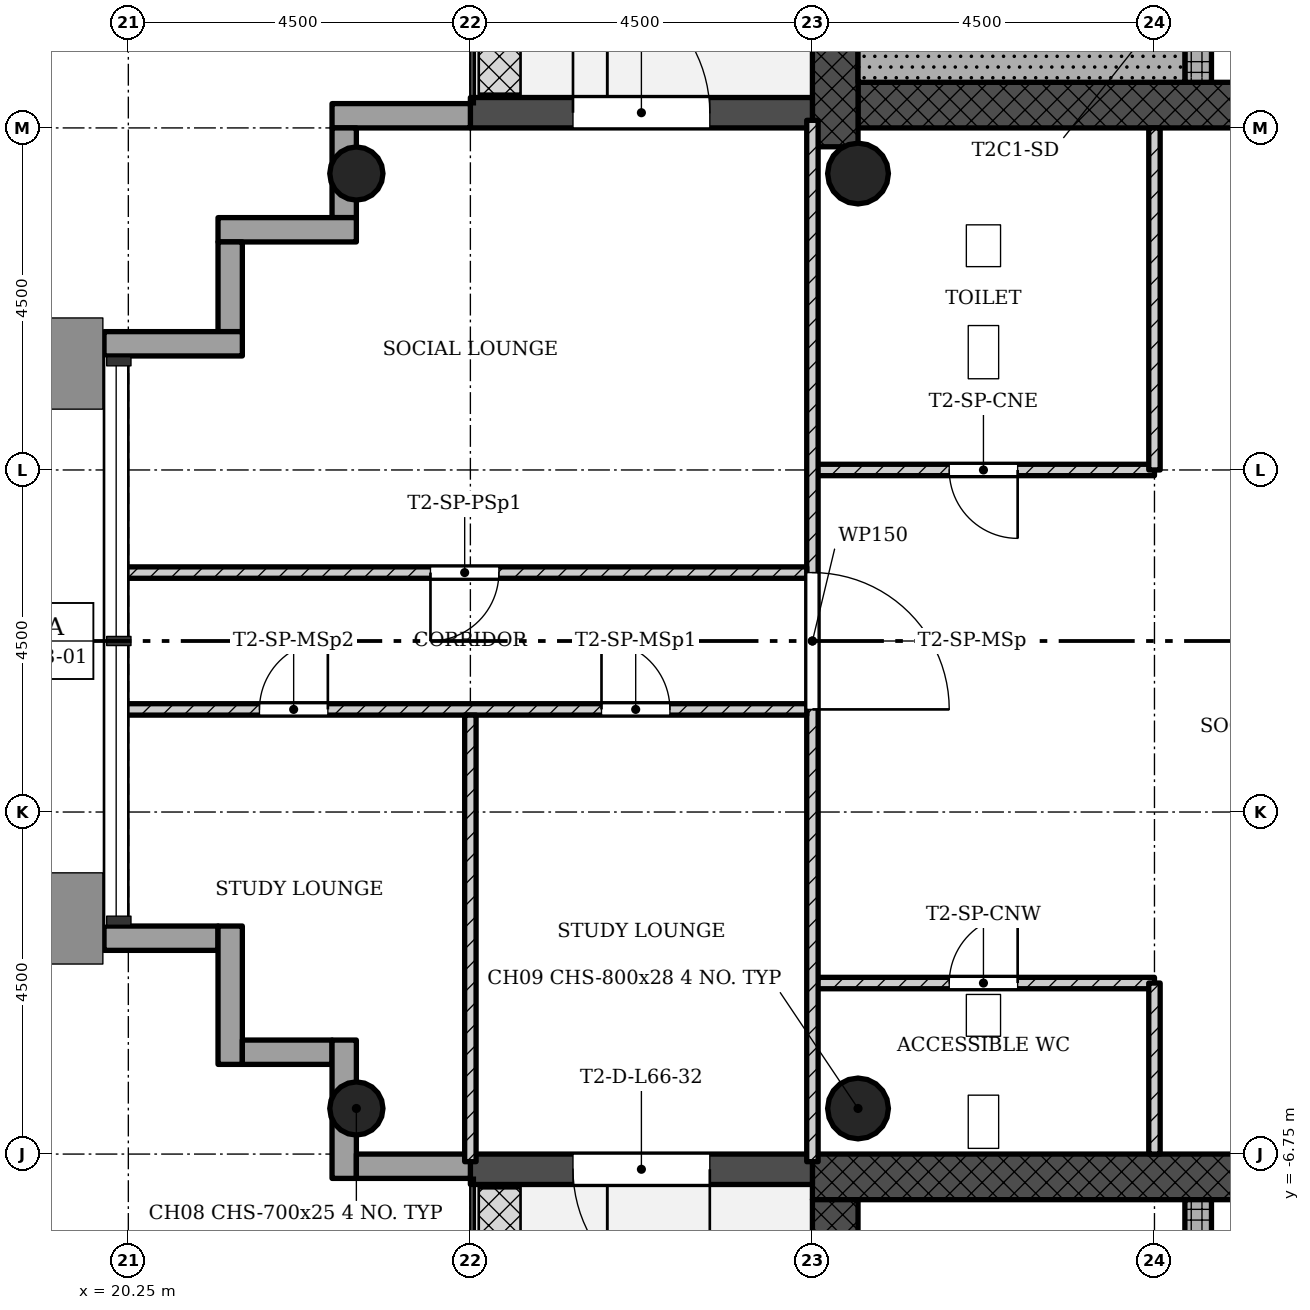
"""IFC4 building model, lengths in metres.
Left out: names, types, materials, properties, quantities, classifications, styles, units other than length and angle.
Written with IfcOpenShell. Run it as: python <this file> out.ifc"""

import sys

from ifc_helpers import new_model, si_unit, direction, frame, frame_2d, origin, origin_2d, place, context, subcontext, project, spatial, rectangle, hollow_circle, extrude, element, fill, save


model = new_model("IFC4")
c1 = context("Model", 3, precision=1e-05, world=origin(), true_north=direction((0.0, 1.0)))
c2 = subcontext(c1, "Body", "Model", "MODEL_VIEW")
j1 = project(units=[si_unit("LENGTHUNIT", "METRE"), si_unit("PLANEANGLEUNIT", "RADIAN")], contexts=[c1])
p1 = place(None, origin())
s1 = spatial("IfcSite", under=j1, at=p1, CompositionType="ELEMENT")
p2 = place(p1, origin())
s2 = spatial("IfcBuilding", under=s1, at=p2, CompositionType="ELEMENT")
p3 = place(p2, frame((0.0, 0.0, 237.9)))
s3 = spatial("IfcBuildingStorey", under=s2, at=p3, CompositionType="ELEMENT", Elevation=237.9)
p4 = place(p3, frame((29.85, 7.05, 0.0), z_axis=(0.0, 0.0, 1.0), x_axis=(1.0, 0.0, 0.0)))
e1 = element("IfcWall", 1, at=p4, inside=s3, PredefinedType="SHEAR", context=c2, shape_type="SweptSolid", body=[
    extrude(rectangle(XDim=12.9, YDim=0.6, at=frame_2d((6.45, 0.0))), origin(), (0.0, 0.0, 1.0), 4.5),
])
p5 = place(p4, frame((5.25, 0.0, 0.0)))
e2 = element("IfcOpeningElement", 2, at=p5, cuts=e1, PredefinedType="OPENING", context=c2, shape_type="SweptSolid", body=[
    extrude(rectangle(XDim=1.8, YDim=2.1, at=frame_2d((0.9, 1.05))), frame((0.0, 0.31, 0.0), z_axis=(0.0, -1.0, 0.0), x_axis=(1.0, 0.0, 0.0)), (0.0, 0.0, 1.0), 0.62),
])
p6 = place(p3, frame((29.55, 15.15, 0.0), z_axis=(0.0, 0.0, 1.0), x_axis=(0.0, -1.0, 0.0)))
e3 = element("IfcWall", 3, at=p6, inside=s3, PredefinedType="SHEAR", context=c2, shape_type="SweptSolid", body=[
    extrude(rectangle(XDim=8.648, YDim=0.6, at=frame_2d((4.324, 0.0))), origin(), (0.0, 0.0, 1.0), 4.5),
])
p7 = place(p3, frame((34.325, 7.35, 0.0), z_axis=(0.0, 0.0, 1.0), x_axis=(0.0, 1.0, 0.0)))
e4 = element("IfcWall", 4, at=p7, inside=s3, PredefinedType="SHEAR", context=c2, shape_type="SweptSolid", body=[
    extrude(rectangle(XDim=7.8, YDim=0.35, at=frame_2d((3.9, 0.0))), origin(), (0.0, 0.0, 1.0), 4.5),
])
p8 = place(p7, frame((1.05, 0.0, 0.0)))
e5 = element("IfcOpeningElement", 5, at=p8, cuts=e4, PredefinedType="OPENING", context=c2, shape_type="SweptSolid", body=[
    extrude(rectangle(XDim=0.9, YDim=2.1, at=frame_2d((0.45, 1.05))), frame((0.0, 0.185, 0.0), z_axis=(0.0, -1.0, 0.0), x_axis=(1.0, 0.0, 0.0)), (0.0, 0.0, 1.0), 0.37),
])
p9 = place(p3, frame((42.15, -7.05, 0.0), z_axis=(0.0, 0.0, 1.0), x_axis=(-1.0, 0.0, 0.0)))
e6 = element("IfcWall", 6, at=p9, inside=s3, PredefinedType="SHEAR", context=c2, shape_type="SweptSolid", body=[
    extrude(rectangle(XDim=12.9, YDim=0.6, at=frame_2d((6.45, 0.0))), origin(), (0.0, 0.0, 1.0), 4.5),
])
p10 = place(p9, frame((5.25, 0.0, 0.0)))
e7 = element("IfcOpeningElement", 7, at=p10, cuts=e6, PredefinedType="OPENING", context=c2, shape_type="SweptSolid", body=[
    extrude(rectangle(XDim=1.8, YDim=2.1, at=frame_2d((0.9, 1.05))), frame((0.0, 0.31, 0.0), z_axis=(0.0, -1.0, 0.0), x_axis=(1.0, 0.0, 0.0)), (0.0, 0.0, 1.0), 0.62),
])
p11 = place(p3, frame((29.55, -7.35, 0.0), z_axis=(0.0, 0.0, 1.0), x_axis=(0.0, -1.0, 0.0)))
e8 = element("IfcWall", 8, at=p11, inside=s3, PredefinedType="SHEAR", context=c2, shape_type="SweptSolid", body=[
    extrude(rectangle(XDim=8.4, YDim=0.6, at=frame_2d((4.2, 0.0))), origin(), (0.0, 0.0, 1.0), 4.5),
])
p12 = place(p3, frame((34.325, -15.15, 0.0), z_axis=(0.0, 0.0, 1.0), x_axis=(0.0, 1.0, 0.0)))
e9 = element("IfcWall", 9, at=p12, inside=s3, PredefinedType="SHEAR", context=c2, shape_type="SweptSolid", body=[
    extrude(rectangle(XDim=7.8, YDim=0.35, at=frame_2d((3.9, 0.0))), origin(), (0.0, 0.0, 1.0), 4.5),
])
p13 = place(p12, frame((5.55, 0.0, 0.0)))
e10 = element("IfcOpeningElement", 10, at=p13, cuts=e9, PredefinedType="OPENING", context=c2, shape_type="SweptSolid", body=[
    extrude(rectangle(XDim=1.1, YDim=2.1, at=frame_2d((0.55, 1.05))), frame((0.0, 0.185, 0.0), z_axis=(0.0, -1.0, 0.0), x_axis=(1.0, 0.0, 0.0)), (0.0, 0.0, 1.0), 0.37),
])
p14 = place(p12, frame((1.2, 0.0, 0.0)))
e11 = element("IfcOpeningElement", 11, at=p14, cuts=e9, PredefinedType="OPENING", context=c2, shape_type="SweptSolid", body=[
    extrude(rectangle(XDim=1.1, YDim=2.1, at=frame_2d((0.55, 1.05))), frame((0.0, 0.185, 0.0), z_axis=(0.0, -1.0, 0.0), x_axis=(1.0, 0.0, 0.0)), (0.0, 0.0, 1.0), 0.37),
])
p15 = place(p12, frame((3.5, 0.0, 0.0)))
e12 = element("IfcOpeningElement", 12, at=p15, cuts=e9, PredefinedType="OPENING", context=c2, shape_type="SweptSolid", body=[
    extrude(rectangle(XDim=0.9, YDim=2.1, at=frame_2d((0.45, 1.05))), frame((0.0, 0.185, 0.0), z_axis=(0.0, -1.0, 0.0), x_axis=(1.0, 0.0, 0.0)), (0.0, 0.0, 1.0), 0.37),
])
for number, where, z_axis, x_axis in (
    (13, (23.25, 6.15, 0.0), (0.0, 0.0, 1.0), (1.0, 0.0, 0.0)),
    (14, (23.25, -6.15, 0.0), (0.0, 0.0, 1.0), (1.0, 0.0, 0.0)),
):
    element("IfcColumn", number, at=place(p3, frame(where, z_axis=z_axis, x_axis=x_axis)), inside=s3, PredefinedType="COLUMN", context=c2, shape_type="SweptSolid", body=[
        extrude(hollow_circle(Radius=0.35, WallThickness=0.025, at=origin_2d()), origin(), (0.0, 0.0, 1.0), 4.5),
    ])
for number, where, z_axis, x_axis in (
    (15, (29.85, 6.15, 0.0), (0.0, 0.0, 1.0), (1.0, 0.0, 0.0)),
    (16, (29.85, -6.15, 0.0), (0.0, 0.0, 1.0), (1.0, 0.0, 0.0)),
):
    element("IfcColumn", number, at=place(p3, frame(where, z_axis=z_axis, x_axis=x_axis)), inside=s3, PredefinedType="COLUMN", context=c2, shape_type="SweptSolid", body=[
        extrude(hollow_circle(Radius=0.4, WallThickness=0.028, at=origin_2d()), origin(), (0.0, 0.0, 1.0), 4.5),
    ])
p16 = place(p3, frame((29.25, 6.95, -0.02), z_axis=(0.0, 0.0, 1.0), x_axis=(-1.0, 0.0, 0.0)))
e17 = element("IfcWall", 17, at=p16, inside=s3, PredefinedType="STANDARD", context=c2, shape_type="SweptSolid", body=[
    extrude(rectangle(XDim=4.5, YDim=0.4, at=frame_2d((2.25, 0.0))), origin(), (0.0, 0.0, 1.0), 4.22),
])
p17 = place(p16, frame((1.35, 0.0, 0.02)))
e18 = element("IfcOpeningElement", 18, at=p17, cuts=e17, PredefinedType="OPENING", context=c2, shape_type="SweptSolid", body=[
    extrude(rectangle(XDim=1.8, YDim=2.1, at=frame_2d((0.9, 1.05))), frame((0.0, 0.21, 0.0), z_axis=(0.0, -1.0, 0.0), x_axis=(1.0, 0.0, 0.0)), (0.0, 0.0, 1.0), 0.42),
])
p18 = place(p3, frame((24.75, 6.91, -0.3), z_axis=(0.0, 0.0, 1.0), x_axis=(-1.0, 0.0, 0.0)))
e19 = element("IfcWall", 19, at=p18, inside=s3, PredefinedType="STANDARD", context=c2, shape_type="SweptSolid", body=[
    extrude(rectangle(XDim=1.82, YDim=0.32, at=frame_2d((0.91, 0.0))), origin(), (0.0, 0.0, 1.0), 4.5),
])
p19 = place(p3, frame((23.09, 6.75, -0.3), z_axis=(0.0, 0.0, 1.0), x_axis=(0.0, -1.0, 0.0)))
e20 = element("IfcWall", 20, at=p19, inside=s3, PredefinedType="STANDARD", context=c2, shape_type="SweptSolid", body=[
    extrude(rectangle(XDim=1.18, YDim=0.32, at=frame_2d((0.59, 0.0))), origin(), (0.0, 0.0, 1.0), 4.5),
])
p20 = place(p3, frame((23.25, 5.41, -0.3), z_axis=(0.0, 0.0, 1.0), x_axis=(-1.0, 0.0, 0.0)))
e21 = element("IfcWall", 21, at=p20, inside=s3, PredefinedType="STANDARD", context=c2, shape_type="SweptSolid", body=[
    extrude(rectangle(XDim=1.82, YDim=0.32, at=frame_2d((0.91, 0.0))), origin(), (0.0, 0.0, 1.0), 4.5),
])
p21 = place(p3, frame((21.59, 5.25, -0.3), z_axis=(0.0, 0.0, 1.0), x_axis=(0.0, -1.0, 0.0)))
e22 = element("IfcWall", 22, at=p21, inside=s3, PredefinedType="STANDARD", context=c2, shape_type="SweptSolid", body=[
    extrude(rectangle(XDim=1.18, YDim=0.32, at=frame_2d((0.59, 0.0))), origin(), (0.0, 0.0, 1.0), 4.5),
])
p22 = place(p3, frame((21.75, 3.91, -0.3), z_axis=(0.0, 0.0, 1.0), x_axis=(-1.0, 0.0, 0.0)))
e23 = element("IfcWall", 23, at=p22, inside=s3, PredefinedType="STANDARD", context=c2, shape_type="SweptSolid", body=[
    extrude(rectangle(XDim=1.82, YDim=0.32, at=frame_2d((0.91, 0.0))), origin(), (0.0, 0.0, 1.0), 4.5),
])
p23 = place(p3, frame((19.93, -3.91, -0.3), z_axis=(0.0, 0.0, 1.0), x_axis=(1.0, 0.0, 0.0)))
e24 = element("IfcWall", 24, at=p23, inside=s3, PredefinedType="STANDARD", context=c2, shape_type="SweptSolid", body=[
    extrude(rectangle(XDim=1.5, YDim=0.32, at=frame_2d((0.75, 0.0))), origin(), (0.0, 0.0, 1.0), 4.5),
])
p24 = place(p3, frame((21.59, -3.75, -0.3), z_axis=(0.0, 0.0, 1.0), x_axis=(0.0, -1.0, 0.0)))
e25 = element("IfcWall", 25, at=p24, inside=s3, PredefinedType="STANDARD", context=c2, shape_type="SweptSolid", body=[
    extrude(rectangle(XDim=1.82, YDim=0.32, at=frame_2d((0.91, 0.0))), origin(), (0.0, 0.0, 1.0), 4.5),
])
p25 = place(p3, frame((21.75, -5.41, -0.3), z_axis=(0.0, 0.0, 1.0), x_axis=(1.0, 0.0, 0.0)))
e26 = element("IfcWall", 26, at=p25, inside=s3, PredefinedType="STANDARD", context=c2, shape_type="SweptSolid", body=[
    extrude(rectangle(XDim=1.18, YDim=0.32, at=frame_2d((0.59, 0.0))), origin(), (0.0, 0.0, 1.0), 4.5),
])
p26 = place(p3, frame((23.09, -5.25, -0.3), z_axis=(0.0, 0.0, 1.0), x_axis=(0.0, -1.0, 0.0)))
e27 = element("IfcWall", 27, at=p26, inside=s3, PredefinedType="STANDARD", context=c2, shape_type="SweptSolid", body=[
    extrude(rectangle(XDim=1.82, YDim=0.32, at=frame_2d((0.91, 0.0))), origin(), (0.0, 0.0, 1.0), 4.5),
])
p27 = place(p3, frame((23.25, -6.91, -0.3), z_axis=(0.0, 0.0, 1.0), x_axis=(1.0, 0.0, 0.0)))
e28 = element("IfcWall", 28, at=p27, inside=s3, PredefinedType="STANDARD", context=c2, shape_type="SweptSolid", body=[
    extrude(rectangle(XDim=1.5, YDim=0.32, at=frame_2d((0.75, 0.0))), origin(), (0.0, 0.0, 1.0), 4.5),
])
p28 = place(p3, frame((24.75, -6.95, -0.02), z_axis=(0.0, 0.0, 1.0), x_axis=(1.0, 0.0, 0.0)))
e29 = element("IfcWall", 29, at=p28, inside=s3, PredefinedType="STANDARD", context=c2, shape_type="SweptSolid", body=[
    extrude(rectangle(XDim=4.5, YDim=0.4, at=frame_2d((2.25, 0.0))), origin(), (0.0, 0.0, 1.0), 4.22),
])
p29 = place(p28, frame((1.35, 0.0, 0.02)))
e30 = element("IfcOpeningElement", 30, at=p29, cuts=e29, PredefinedType="OPENING", context=c2, shape_type="SweptSolid", body=[
    extrude(rectangle(XDim=1.8, YDim=2.1, at=frame_2d((0.9, 1.05))), frame((0.0, 0.21, 0.0), z_axis=(0.0, -1.0, 0.0), x_axis=(1.0, 0.0, 0.0)), (0.0, 0.0, 1.0), 0.42),
])
p30 = place(p3, frame((33.75, 2.25, 0.0), z_axis=(0.0, 0.0, 1.0), x_axis=(-1.0, 0.0, 0.0)))
e31 = element("IfcWall", 31, at=p30, inside=s3, PredefinedType="PARTITIONING", context=c2, shape_type="SweptSolid", body=[
    extrude(rectangle(XDim=4.5, YDim=0.15, at=frame_2d((2.25, 0.0))), origin(), (0.0, 0.0, 1.0), 4.1),
])
p31 = place(p30, frame((1.8, 0.0, 0.0)))
e32 = element("IfcOpeningElement", 32, at=p31, cuts=e31, PredefinedType="OPENING", context=c2, shape_type="SweptSolid", body=[
    extrude(rectangle(XDim=0.9, YDim=2.1, at=frame_2d((0.45, 1.05))), frame((0.0, 0.085, 0.0), z_axis=(0.0, -1.0, 0.0), x_axis=(1.0, 0.0, 0.0)), (0.0, 0.0, 1.0), 0.17),
])
p32 = place(p3, frame((33.75, 2.25, 0.0), z_axis=(0.0, 0.0, 1.0), x_axis=(0.0, 1.0, 0.0)))
e33 = element("IfcWall", 33, at=p32, inside=s3, PredefinedType="PARTITIONING", context=c2, shape_type="SweptSolid", body=[
    extrude(rectangle(XDim=4.5, YDim=0.15, at=frame_2d((2.25, 0.0))), origin(), (0.0, 0.0, 1.0), 4.1),
])
p33 = place(p3, frame((33.75, -4.5, 0.0), z_axis=(0.0, 0.0, 1.0), x_axis=(-1.0, 0.0, 0.0)))
e34 = element("IfcWall", 34, at=p33, inside=s3, PredefinedType="PARTITIONING", context=c2, shape_type="SweptSolid", body=[
    extrude(rectangle(XDim=4.5, YDim=0.15, at=frame_2d((2.25, 0.0))), origin(), (0.0, 0.0, 1.0), 4.1),
])
p34 = place(p33, frame((1.8, 0.0, 0.0)))
e35 = element("IfcOpeningElement", 35, at=p34, cuts=e34, PredefinedType="OPENING", context=c2, shape_type="SweptSolid", body=[
    extrude(rectangle(XDim=0.9, YDim=2.1, at=frame_2d((0.45, 1.05))), frame((0.0, 0.085, 0.0), z_axis=(0.0, -1.0, 0.0), x_axis=(1.0, 0.0, 0.0)), (0.0, 0.0, 1.0), 0.17),
])
p35 = place(p3, frame((33.75, -6.75, 0.0), z_axis=(0.0, 0.0, 1.0), x_axis=(0.0, 1.0, 0.0)))
e36 = element("IfcWall", 36, at=p35, inside=s3, PredefinedType="PARTITIONING", context=c2, shape_type="SweptSolid", body=[
    extrude(rectangle(XDim=2.25, YDim=0.15, at=frame_2d((1.125, 0.0))), origin(), (0.0, 0.0, 1.0), 4.1),
])
p36 = place(p3, frame((29.25, -6.85, 0.0), z_axis=(0.0, 0.0, 1.0), x_axis=(0.0, 1.0, 0.0)))
e37 = element("IfcWall", 37, at=p36, inside=s3, PredefinedType="PARTITIONING", context=c2, shape_type="SweptSolid", body=[
    extrude(rectangle(XDim=13.7, YDim=0.15, at=frame_2d((6.85, 0.0))), origin(), (0.0, 0.0, 1.0), 4.1),
])
p37 = place(p36, frame((5.95, 0.0, 0.0)))
e38 = element("IfcOpeningElement", 38, at=p37, cuts=e37, PredefinedType="OPENING", context=c2, shape_type="SweptSolid", body=[
    extrude(rectangle(XDim=1.8, YDim=2.1, at=frame_2d((0.9, 1.05))), frame((0.0, 0.085, 0.0), z_axis=(0.0, -1.0, 0.0), x_axis=(1.0, 0.0, 0.0)), (0.0, 0.0, 1.0), 0.17),
])
p38 = place(p3, frame((29.175, 0.9, 0.0), z_axis=(0.0, 0.0, 1.0), x_axis=(-1.0, 0.0, 0.0)))
e39 = element("IfcWall", 39, at=p38, inside=s3, PredefinedType="PARTITIONING", context=c2, shape_type="SweptSolid", body=[
    extrude(rectangle(XDim=9.025, YDim=0.15, at=frame_2d((4.513, 0.0))), origin(), (0.0, 0.0, 1.0), 4.1),
])
p39 = place(p38, frame((4.05, 0.0, 0.0)))
e40 = element("IfcOpeningElement", 40, at=p39, cuts=e39, PredefinedType="OPENING", context=c2, shape_type="SweptSolid", body=[
    extrude(rectangle(XDim=0.9, YDim=2.1, at=frame_2d((0.45, 1.05))), frame((0.0, 0.085, 0.0), z_axis=(0.0, -1.0, 0.0), x_axis=(1.0, 0.0, 0.0)), (0.0, 0.0, 1.0), 0.17),
])
p40 = place(p3, frame((29.175, -0.9, 0.0), z_axis=(0.0, 0.0, 1.0), x_axis=(-1.0, 0.0, 0.0)))
e41 = element("IfcWall", 41, at=p40, inside=s3, PredefinedType="PARTITIONING", context=c2, shape_type="SweptSolid", body=[
    extrude(rectangle(XDim=9.025, YDim=0.15, at=frame_2d((4.513, 0.0))), origin(), (0.0, 0.0, 1.0), 4.1),
])
p41 = place(p40, frame((1.8, 0.0, 0.0)))
e42 = element("IfcOpeningElement", 42, at=p41, cuts=e41, PredefinedType="OPENING", context=c2, shape_type="SweptSolid", body=[
    extrude(rectangle(XDim=0.9, YDim=2.1, at=frame_2d((0.45, 1.05))), frame((0.0, 0.085, 0.0), z_axis=(0.0, -1.0, 0.0), x_axis=(1.0, 0.0, 0.0)), (0.0, 0.0, 1.0), 0.17),
])
p42 = place(p40, frame((6.3, 0.0, 0.0)))
e43 = element("IfcOpeningElement", 43, at=p42, cuts=e41, PredefinedType="OPENING", context=c2, shape_type="SweptSolid", body=[
    extrude(rectangle(XDim=0.9, YDim=2.1, at=frame_2d((0.45, 1.05))), frame((0.0, 0.085, 0.0), z_axis=(0.0, -1.0, 0.0), x_axis=(1.0, 0.0, 0.0)), (0.0, 0.0, 1.0), 0.17),
])
p43 = place(p3, frame((24.75, -0.975, 0.0), z_axis=(0.0, 0.0, 1.0), x_axis=(0.0, -1.0, 0.0)))
e44 = element("IfcWall", 44, at=p43, inside=s3, PredefinedType="PARTITIONING", context=c2, shape_type="SweptSolid", body=[
    extrude(rectangle(XDim=5.875, YDim=0.15, at=frame_2d((2.938, 0.0))), origin(), (0.0, 0.0, 1.0), 4.1),
])
p44 = place(p3, frame((34.15, 7.65, 0.0), z_axis=(0.0, 0.0, 1.0), x_axis=(-1.0, 0.0, 0.0)))
e45 = element("IfcWall", 45, at=p44, inside=s3, PredefinedType="SHEAR", context=c2, shape_type="SweptSolid", body=[
    extrude(rectangle(XDim=4.3, YDim=0.6, at=frame_2d((2.15, 0.0))), origin(), (0.0, 0.0, 1.0), 4.5),
])
p45 = place(p17, origin())
e46 = element("IfcDoor", 46, at=p45, inside=s3, OperationType="SINGLE_SWING_RIGHT", PredefinedType="DOOR", context=c2, shape_type="SweptSolid", body=[
    extrude(rectangle(XDim=1.8, YDim=2.1, at=frame_2d((0.9, 1.05))), frame((0.0, 0.025, 0.0), z_axis=(0.0, -1.0, 0.0), x_axis=(1.0, 0.0, 0.0)), (0.0, 0.0, 1.0), 0.05),
])
fill(e18, e46)
p46 = place(p29, origin())
e47 = element("IfcDoor", 47, at=p46, inside=s3, OperationType="SINGLE_SWING_RIGHT", PredefinedType="DOOR", context=c2, shape_type="SweptSolid", body=[
    extrude(rectangle(XDim=1.8, YDim=2.1, at=frame_2d((0.9, 1.05))), frame((0.0, 0.025, 0.0), z_axis=(0.0, -1.0, 0.0), x_axis=(1.0, 0.0, 0.0)), (0.0, 0.0, 1.0), 0.05),
])
fill(e30, e47)
p47 = place(p31, origin())
e48 = element("IfcDoor", 48, at=p47, inside=s3, OperationType="SINGLE_SWING_RIGHT", PredefinedType="DOOR", context=c2, shape_type="SweptSolid", body=[
    extrude(rectangle(XDim=0.9, YDim=2.1, at=frame_2d((0.45, 1.05))), frame((0.0, 0.025, 0.0), z_axis=(0.0, -1.0, 0.0), x_axis=(1.0, 0.0, 0.0)), (0.0, 0.0, 1.0), 0.05),
])
fill(e32, e48)
p48 = place(p34, origin())
e49 = element("IfcDoor", 49, at=p48, inside=s3, OperationType="SINGLE_SWING_LEFT", PredefinedType="DOOR", context=c2, shape_type="SweptSolid", body=[
    extrude(rectangle(XDim=0.9, YDim=2.1, at=frame_2d((0.45, 1.05))), frame((0.0, 0.025, 0.0), z_axis=(0.0, -1.0, 0.0), x_axis=(1.0, 0.0, 0.0)), (0.0, 0.0, 1.0), 0.05),
])
fill(e35, e49)
p49 = place(p37, origin())
e50 = element("IfcDoor", 50, at=p49, inside=s3, OperationType="SINGLE_SWING_LEFT", PredefinedType="DOOR", context=c2, shape_type="SweptSolid", body=[
    extrude(rectangle(XDim=1.8, YDim=2.1, at=frame_2d((0.9, 1.05))), frame((0.0, 0.025, 0.0), z_axis=(0.0, -1.0, 0.0), x_axis=(1.0, 0.0, 0.0)), (0.0, 0.0, 1.0), 0.05),
])
fill(e38, e50)
p50 = place(p39, origin())
e51 = element("IfcDoor", 51, at=p50, inside=s3, OperationType="SINGLE_SWING_LEFT", PredefinedType="DOOR", context=c2, shape_type="SweptSolid", body=[
    extrude(rectangle(XDim=0.9, YDim=2.1, at=frame_2d((0.45, 1.05))), frame((0.0, 0.025, 0.0), z_axis=(0.0, -1.0, 0.0), x_axis=(1.0, 0.0, 0.0)), (0.0, 0.0, 1.0), 0.05),
])
fill(e40, e51)
p51 = place(p41, origin())
e52 = element("IfcDoor", 52, at=p51, inside=s3, OperationType="SINGLE_SWING_RIGHT", PredefinedType="DOOR", context=c2, shape_type="SweptSolid", body=[
    extrude(rectangle(XDim=0.9, YDim=2.1, at=frame_2d((0.45, 1.05))), frame((0.0, 0.025, 0.0), z_axis=(0.0, -1.0, 0.0), x_axis=(1.0, 0.0, 0.0)), (0.0, 0.0, 1.0), 0.05),
])
fill(e42, e52)
p52 = place(p42, origin())
e53 = element("IfcDoor", 53, at=p52, inside=s3, OperationType="SINGLE_SWING_LEFT", PredefinedType="DOOR", context=c2, shape_type="SweptSolid", body=[
    extrude(rectangle(XDim=0.9, YDim=2.1, at=frame_2d((0.45, 1.05))), frame((0.0, 0.025, 0.0), z_axis=(0.0, -1.0, 0.0), x_axis=(1.0, 0.0, 0.0)), (0.0, 0.0, 1.0), 0.05),
])
fill(e43, e53)
save(model, sys.argv[1])
